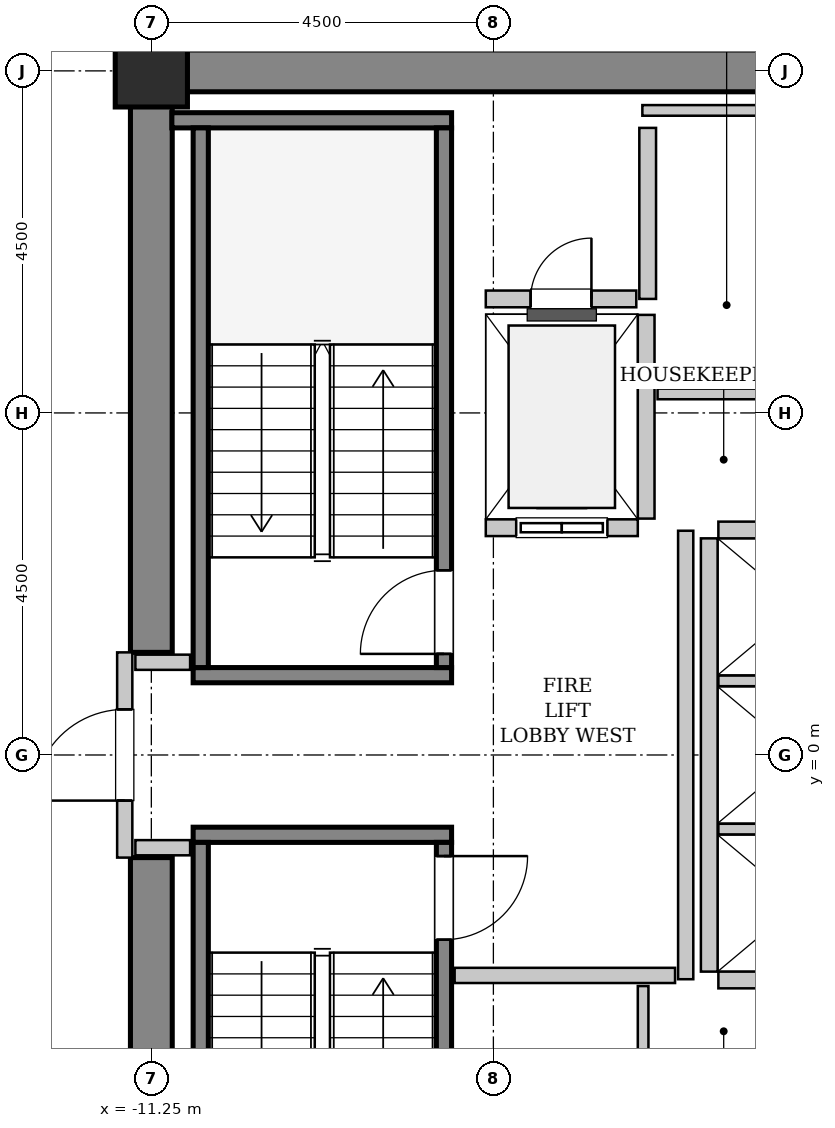
"""IFC4 building model, lengths in metres.
Left out: names, types, materials, properties, quantities, classifications, styles, units other than length and angle.
Written with IfcOpenShell. Run it as: python <this file> out.ifc"""

import sys

from ifc_helpers import new_model, si_unit, direction, frame, frame_2d, origin, origin_2d, place, context, subcontext, project, spatial, rectangle, hollow_rectangle, extrude, source, transform, mapped, element, fill, save


model = new_model("IFC4")
c1 = context("Model", 3, precision=1e-05, world=origin(), true_north=direction((0.0, 1.0)))
c2 = subcontext(c1, "Body", "Model", "MODEL_VIEW")
j1 = project(units=[si_unit("LENGTHUNIT", "METRE"), si_unit("PLANEANGLEUNIT", "RADIAN")], contexts=[c1])
p1 = place(None, origin())
s1 = spatial("IfcSite", under=j1, at=p1, CompositionType="ELEMENT")
p2 = place(p1, origin())
s2 = spatial("IfcBuilding", under=s1, at=p2, CompositionType="ELEMENT")
p3 = place(p2, frame((0.0, 0.0, 152.6)))
s3 = spatial("IfcBuildingStorey", under=s2, at=p3, CompositionType="ELEMENT", Elevation=152.6)
m1 = source(origin(), c2, "Body", "SweptSolid", [
    extrude(rectangle(XDim=9.975, YDim=0.55, at=frame_2d((4.987, 0.0))), origin(), (0.0, 0.0, 1.0), 3.8),
])
p4 = place(p3, frame((-11.525, 9.0, 0.0), z_axis=(0.0, 0.0, 1.0), x_axis=(1.0, 0.0, 0.0)))
e1 = element("IfcWall", 1, at=p4, inside=s3, PredefinedType="SHEAR", context=c2, shape_type="MappedRepresentation", body=[
    mapped(m1, transform((0.0, 0.0, 0.0), x_axis=(1.0, 0.0, 0.0), y_axis=(0.0, 1.0, 0.0), z_axis=(0.0, 0.0, 1.0), scale=1.0)),
])
m2 = source(origin(), c2, "Body", "SweptSolid", [
    extrude(rectangle(XDim=7.375, YDim=0.55, at=frame_2d((3.688, 0.0))), origin(), (0.0, 0.0, 1.0), 3.8),
])
for number, where, z_axis, x_axis in (
    (2, (-11.25, -8.725, 0.0), (0.0, 0.0, 1.0), (0.0, 1.0, 0.0)),
    (3, (-11.25, 1.35, 0.0), (0.0, 0.0, 1.0), (0.0, 1.0, 0.0)),
):
    element("IfcWall", number, at=place(p3, frame(where, z_axis=z_axis, x_axis=x_axis)), inside=s3, PredefinedType="SHEAR", context=c2, shape_type="MappedRepresentation", body=[
        mapped(m2, transform((0.0, 0.0, 0.0), x_axis=(1.0, 0.0, 0.0), y_axis=(0.0, 1.0, 0.0), z_axis=(0.0, 0.0, 1.0), scale=1.0)),
    ])
m3 = source(origin(), c2, "Body", "SweptSolid", [
    extrude(hollow_rectangle(XDim=0.95, YDim=0.95, WallThickness=0.045, InnerFilletRadius=0.045, OuterFilletRadius=0.09, at=origin_2d()), origin(), (0.0, 0.0, 1.0), 3.8),
])
p5 = place(p3, frame((-11.25, 9.0, 0.0), z_axis=(0.0, 0.0, 1.0), x_axis=(1.0, 0.0, 0.0)))
e4 = element("IfcColumn", 4, at=p5, inside=s3, PredefinedType="COLUMN", context=c2, shape_type="MappedRepresentation", body=[
    mapped(m3, transform((0.0, 0.0, 0.0), x_axis=(1.0, 0.0, 0.0), y_axis=(0.0, 1.0, 0.0), z_axis=(0.0, 0.0, 1.0), scale=1.0)),
])
m4 = source(origin(), c2, "Body", "SweptSolid", [
    extrude(rectangle(XDim=3.4, YDim=0.2, at=frame_2d((1.7, 0.0))), origin(), (0.0, 0.0, 1.0), 3.8),
])
p6 = place(p3, frame((-7.3, 1.05, 0.0), z_axis=(0.0, 0.0, 1.0), x_axis=(-1.0, 0.0, 0.0)))
e5 = element("IfcWall", 5, at=p6, inside=s3, PredefinedType="SOLIDWALL", context=c2, shape_type="MappedRepresentation", body=[
    mapped(m4, transform((0.0, 0.0, 0.0), x_axis=(1.0, 0.0, 0.0), y_axis=(0.0, 1.0, 0.0), z_axis=(0.0, 0.0, 1.0), scale=1.0)),
])
m5 = source(origin(), c2, "Body", "SweptSolid", [
    extrude(rectangle(XDim=3.68, YDim=0.2, at=frame_2d((1.84, 0.0))), origin(), (0.0, 0.0, 1.0), 3.8),
])
p7 = place(p3, frame((-7.3, 8.35, 0.0), z_axis=(0.0, 0.0, 1.0), x_axis=(-1.0, 0.0, 0.0)))
e6 = element("IfcWall", 6, at=p7, inside=s3, PredefinedType="SOLIDWALL", context=c2, shape_type="MappedRepresentation", body=[
    mapped(m5, transform((0.0, 0.0, 0.0), x_axis=(1.0, 0.0, 0.0), y_axis=(0.0, 1.0, 0.0), z_axis=(0.0, 0.0, 1.0), scale=1.0)),
])
m6 = source(origin(), c2, "Body", "SweptSolid", [
    extrude(rectangle(XDim=7.1, YDim=0.2, at=frame_2d((3.55, 0.0))), origin(), (0.0, 0.0, 1.0), 3.8),
])
p8 = place(p3, frame((-7.4, 1.15, 0.0), z_axis=(0.0, 0.0, 1.0), x_axis=(0.0, 1.0, 0.0)))
e7 = element("IfcWall", 7, at=p8, inside=s3, PredefinedType="SOLIDWALL", context=c2, shape_type="MappedRepresentation", body=[
    mapped(m6, transform((0.0, 0.0, 0.0), x_axis=(1.0, 0.0, 0.0), y_axis=(0.0, 1.0, 0.0), z_axis=(0.0, 0.0, 1.0), scale=1.0)),
])
p9 = place(p8, frame((0.18, 0.0, 0.0)))
e8 = element("IfcOpeningElement", 8, at=p9, cuts=e7, PredefinedType="OPENING", context=c2, shape_type="SweptSolid", body=[
    extrude(rectangle(XDim=1.1, YDim=2.15, at=frame_2d((0.55, 1.075))), frame((0.0, 0.11, 0.0), z_axis=(0.0, -1.0, 0.0), x_axis=(1.0, 0.0, 0.0)), (0.0, 0.0, 1.0), 0.22),
])
p10 = place(p3, frame((-10.6, 1.15, 0.0), z_axis=(0.0, 0.0, 1.0), x_axis=(0.0, 1.0, 0.0)))
e9 = element("IfcWall", 9, at=p10, inside=s3, PredefinedType="SOLIDWALL", context=c2, shape_type="MappedRepresentation", body=[
    mapped(m6, transform((0.0, 0.0, 0.0), x_axis=(1.0, 0.0, 0.0), y_axis=(0.0, 1.0, 0.0), z_axis=(0.0, 0.0, 1.0), scale=1.0)),
])
p11 = place(p3, frame((-10.7, -1.05, 0.0), z_axis=(0.0, 0.0, 1.0), x_axis=(1.0, 0.0, 0.0)))
e10 = element("IfcWall", 10, at=p11, inside=s3, PredefinedType="SOLIDWALL", context=c2, shape_type="MappedRepresentation", body=[
    mapped(m4, transform((0.0, 0.0, 0.0), x_axis=(1.0, 0.0, 0.0), y_axis=(0.0, 1.0, 0.0), z_axis=(0.0, 0.0, 1.0), scale=1.0)),
])
p12 = place(p3, frame((-10.6, -1.15, 0.0), z_axis=(0.0, 0.0, 1.0), x_axis=(0.0, -1.0, 0.0)))
e11 = element("IfcWall", 11, at=p12, inside=s3, PredefinedType="SOLIDWALL", context=c2, shape_type="MappedRepresentation", body=[
    mapped(m6, transform((0.0, 0.0, 0.0), x_axis=(1.0, 0.0, 0.0), y_axis=(0.0, 1.0, 0.0), z_axis=(0.0, 0.0, 1.0), scale=1.0)),
])
p13 = place(p3, frame((-7.4, -1.15, 0.0), z_axis=(0.0, 0.0, 1.0), x_axis=(0.0, -1.0, 0.0)))
e12 = element("IfcWall", 12, at=p13, inside=s3, PredefinedType="SOLIDWALL", context=c2, shape_type="MappedRepresentation", body=[
    mapped(m6, transform((0.0, 0.0, 0.0), x_axis=(1.0, 0.0, 0.0), y_axis=(0.0, 1.0, 0.0), z_axis=(0.0, 0.0, 1.0), scale=1.0)),
])
p14 = place(p13, frame((0.18, 0.0, 0.0)))
e13 = element("IfcOpeningElement", 13, at=p14, cuts=e12, PredefinedType="OPENING", context=c2, shape_type="SweptSolid", body=[
    extrude(rectangle(XDim=1.1, YDim=2.15, at=frame_2d((0.55, 1.075))), frame((0.0, 0.11, 0.0), z_axis=(0.0, -1.0, 0.0), x_axis=(1.0, 0.0, 0.0)), (0.0, 0.0, 1.0), 0.22),
])
m7 = source(origin(), c2, "Body", "SweptSolid", [
    extrude(rectangle(XDim=2.0, YDim=0.22, at=frame_2d((1.0, 0.0))), origin(), (0.0, 0.0, 1.0), 3.535),
])
p15 = place(p3, frame((-6.85, 2.99, 0.0), z_axis=(0.0, 0.0, 1.0), x_axis=(1.0, 0.0, 0.0)))
e14 = element("IfcWall", 14, at=p15, inside=s3, PredefinedType="SOLIDWALL", context=c2, shape_type="MappedRepresentation", body=[
    mapped(m7, transform((0.0, 0.0, 0.0), x_axis=(1.0, 0.0, 0.0), y_axis=(0.0, 1.0, 0.0), z_axis=(0.0, 0.0, 1.0), scale=1.0)),
])
p16 = place(p15, frame((0.4, 0.0, 0.0)))
e15 = element("IfcOpeningElement", 15, at=p16, cuts=e14, PredefinedType="OPENING", context=c2, shape_type="SweptSolid", body=[
    extrude(rectangle(XDim=1.2, YDim=2.2, at=frame_2d((0.6, 1.1))), frame((0.0, 0.12, 0.0), z_axis=(0.0, -1.0, 0.0), x_axis=(1.0, 0.0, 0.0)), (0.0, 0.0, 1.0), 0.24),
])
m8 = source(origin(), c2, "Body", "SweptSolid", [
    extrude(rectangle(XDim=2.68, YDim=0.22, at=frame_2d((1.34, 0.0))), origin(), (0.0, 0.0, 1.0), 3.535),
])
p17 = place(p3, frame((-4.74, 3.11, 0.0), z_axis=(0.0, 0.0, 1.0), x_axis=(0.0, 1.0, 0.0)))
e16 = element("IfcWall", 16, at=p17, inside=s3, PredefinedType="SOLIDWALL", context=c2, shape_type="MappedRepresentation", body=[
    mapped(m8, transform((0.0, 0.0, 0.0), x_axis=(1.0, 0.0, 0.0), y_axis=(0.0, 1.0, 0.0), z_axis=(0.0, 0.0, 1.0), scale=1.0)),
])
m9 = source(origin(), c2, "Body", "SweptSolid", [
    extrude(rectangle(XDim=5.7, YDim=0.22, at=frame_2d((2.85, 0.0))), origin(), (0.0, 0.0, 1.0), 3.535),
])
p18 = place(p3, frame((-3.91, 2.85, 0.0), z_axis=(0.0, 0.0, 1.0), x_axis=(0.0, -1.0, 0.0)))
e17 = element("IfcWall", 17, at=p18, inside=s3, PredefinedType="SOLIDWALL", context=c2, shape_type="MappedRepresentation", body=[
    mapped(m9, transform((0.0, 0.0, 0.0), x_axis=(1.0, 0.0, 0.0), y_axis=(0.0, 1.0, 0.0), z_axis=(0.0, 0.0, 1.0), scale=1.0)),
])
m10 = source(origin(), c2, "Body", "SweptSolid", [
    extrude(rectangle(XDim=2.13, YDim=0.22, at=frame_2d((1.065, 0.0))), origin(), (0.0, 0.0, 1.0), 3.535),
])
p19 = place(p3, frame((-3.79, -2.96, 0.0), z_axis=(0.0, 0.0, 1.0), x_axis=(1.0, 0.0, 0.0)))
e18 = element("IfcWall", 18, at=p19, inside=s3, PredefinedType="SOLIDWALL", context=c2, shape_type="MappedRepresentation", body=[
    mapped(m10, transform((0.0, 0.0, 0.0), x_axis=(1.0, 0.0, 0.0), y_axis=(0.0, 1.0, 0.0), z_axis=(0.0, 0.0, 1.0), scale=1.0)),
])
m11 = source(origin(), c2, "Body", "SweptSolid", [
    extrude(rectangle(XDim=2.13, YDim=0.14, at=frame_2d((1.065, 0.0))), origin(), (0.0, 0.0, 1.0), 3.535),
])
for number, where, z_axis, x_axis in (
    (19, (-3.79, -0.975, 0.0), (0.0, 0.0, 1.0), (1.0, 0.0, 0.0)),
    (20, (-3.79, 0.975, 0.0), (0.0, 0.0, 1.0), (1.0, 0.0, 0.0)),
):
    element("IfcWall", number, at=place(p3, frame(where, z_axis=z_axis, x_axis=x_axis)), inside=s3, PredefinedType="PARTITIONING", context=c2, shape_type="MappedRepresentation", body=[
        mapped(m11, transform((0.0, 0.0, 0.0), x_axis=(1.0, 0.0, 0.0), y_axis=(0.0, 1.0, 0.0), z_axis=(0.0, 0.0, 1.0), scale=1.0)),
    ])
p20 = place(p3, frame((-1.66, 2.96, 0.0), z_axis=(0.0, 0.0, 1.0), x_axis=(-1.0, 0.0, 0.0)))
e21 = element("IfcWall", 21, at=p20, inside=s3, PredefinedType="SOLIDWALL", context=c2, shape_type="MappedRepresentation", body=[
    mapped(m10, transform((0.0, 0.0, 0.0), x_axis=(1.0, 0.0, 0.0), y_axis=(0.0, 1.0, 0.0), z_axis=(0.0, 0.0, 1.0), scale=1.0)),
])
m12 = source(origin(), c2, "Body", "SweptSolid", [
    extrude(rectangle(XDim=2.25, YDim=0.22, at=frame_2d((1.125, 0.0))), origin(), (0.0, 0.0, 1.0), 3.535),
])
p21 = place(p3, frame((-4.72, 6.0, 0.0), z_axis=(0.0, 0.0, 1.0), x_axis=(0.0, 1.0, 0.0)))
e22 = element("IfcWall", 22, at=p21, inside=s3, PredefinedType="SOLIDWALL", context=c2, shape_type="MappedRepresentation", body=[
    mapped(m12, transform((0.0, 0.0, 0.0), x_axis=(1.0, 0.0, 0.0), y_axis=(0.0, 1.0, 0.0), z_axis=(0.0, 0.0, 1.0), scale=1.0)),
])
m13 = source(origin(), c2, "Body", "SweptSolid", [
    extrude(rectangle(XDim=1.98, YDim=0.22, at=frame_2d((0.99, 0.0))), origin(), (0.0, 0.0, 1.0), 3.535),
])
p22 = place(p3, frame((-6.85, 6.0, 0.0), z_axis=(0.0, 0.0, 1.0), x_axis=(1.0, 0.0, 0.0)))
e23 = element("IfcWall", 23, at=p22, inside=s3, PredefinedType="SOLIDWALL", context=c2, shape_type="MappedRepresentation", body=[
    mapped(m13, transform((0.0, 0.0, 0.0), x_axis=(1.0, 0.0, 0.0), y_axis=(0.0, 1.0, 0.0), z_axis=(0.0, 0.0, 1.0), scale=1.0)),
])
p23 = place(p22, frame((0.59, 0.0, 0.0)))
e24 = element("IfcOpeningElement", 24, at=p23, cuts=e23, PredefinedType="OPENING", context=c2, shape_type="SweptSolid", body=[
    extrude(rectangle(XDim=0.8, YDim=2.0, at=frame_2d((0.4, 1.0))), frame((0.0, 0.12, 0.0), z_axis=(0.0, -1.0, 0.0), x_axis=(1.0, 0.0, 0.0)), (0.0, 0.0, 1.0), 0.24),
])
m14 = source(origin(), c2, "Body", "SweptSolid", [
    extrude(rectangle(XDim=2.7, YDim=0.2, at=frame_2d((1.35, 0.0))), origin(), (0.0, 0.0, 1.0), 2.425),
])
p24 = place(p3, frame((-11.6, -1.35, 0.0), z_axis=(0.0, 0.0, 1.0), x_axis=(0.0, 1.0, 0.0)))
e25 = element("IfcWall", 25, at=p24, inside=s3, PredefinedType="PARTITIONING", context=c2, shape_type="MappedRepresentation", body=[
    mapped(m14, transform((0.0, 0.0, 0.0), x_axis=(1.0, 0.0, 0.0), y_axis=(0.0, 1.0, 0.0), z_axis=(0.0, 0.0, 1.0), scale=1.0)),
])
p25 = place(p24, frame((0.75, 0.0, 0.0)))
e26 = element("IfcOpeningElement", 26, at=p25, cuts=e25, PredefinedType="OPENING", context=c2, shape_type="SweptSolid", body=[
    extrude(rectangle(XDim=1.2, YDim=2.15, at=frame_2d((0.6, 1.075))), frame((0.0, 0.11, 0.0), z_axis=(0.0, -1.0, 0.0), x_axis=(1.0, 0.0, 0.0)), (0.0, 0.0, 1.0), 0.22),
])
m15 = source(origin(), c2, "Body", "SweptSolid", [
    extrude(rectangle(XDim=5.9, YDim=0.2, at=frame_2d((2.95, 0.0))), origin(), (0.0, 0.0, 1.0), 3.535),
])
p26 = place(p3, frame((-4.22, -2.95, 0.0), z_axis=(0.0, 0.0, 1.0), x_axis=(0.0, 1.0, 0.0)))
e27 = element("IfcWall", 27, at=p26, inside=s3, PredefinedType="PARTITIONING", context=c2, shape_type="MappedRepresentation", body=[
    mapped(m15, transform((0.0, 0.0, 0.0), x_axis=(1.0, 0.0, 0.0), y_axis=(0.0, 1.0, 0.0), z_axis=(0.0, 0.0, 1.0), scale=1.0)),
])
m16 = source(origin(), c2, "Body", "SweptSolid", [
    extrude(rectangle(XDim=2.9, YDim=0.2, at=frame_2d((1.45, 0.0))), origin(), (0.0, 0.0, 1.0), 3.535),
])
p27 = place(p3, frame((-7.26, -2.9, 0.0), z_axis=(0.0, 0.0, 1.0), x_axis=(1.0, 0.0, 0.0)))
e28 = element("IfcWall", 28, at=p27, inside=s3, PredefinedType="PARTITIONING", context=c2, shape_type="MappedRepresentation", body=[
    mapped(m16, transform((0.0, 0.0, 0.0), x_axis=(1.0, 0.0, 0.0), y_axis=(0.0, 1.0, 0.0), z_axis=(0.0, 0.0, 1.0), scale=1.0)),
])
m17 = source(origin(), c2, "Body", "SweptSolid", [
    extrude(rectangle(XDim=0.72, YDim=0.2, at=frame_2d((0.36, 0.0))), origin(), (0.0, 0.0, 1.0), 3.535),
])
for number, where, z_axis, x_axis in (
    (29, (-11.46, 1.22, 0.0), (0.0, 0.0, 1.0), (1.0, 0.0, 0.0)),
    (30, (-11.46, -1.22, 0.0), (0.0, 0.0, 1.0), (1.0, 0.0, 0.0)),
):
    element("IfcWall", number, at=place(p3, frame(where, z_axis=z_axis, x_axis=x_axis)), inside=s3, PredefinedType="PARTITIONING", context=c2, shape_type="MappedRepresentation", body=[
        mapped(m17, transform((0.0, 0.0, 0.0), x_axis=(1.0, 0.0, 0.0), y_axis=(0.0, 1.0, 0.0), z_axis=(0.0, 0.0, 1.0), scale=1.0)),
    ])
m18 = source(origin(), c2, "Body", "SweptSolid", [
    extrude(rectangle(XDim=2.95, YDim=0.14, at=frame_2d((1.475, 0.0))), origin(), (0.0, 0.0, 1.0), 3.535),
])
p28 = place(p3, frame((-4.59, 4.75, 0.0), z_axis=(0.0, 0.0, 1.0), x_axis=(1.0, 0.0, 0.0)))
e31 = element("IfcWall", 31, at=p28, inside=s3, PredefinedType="PARTITIONING", context=c2, shape_type="MappedRepresentation", body=[
    mapped(m18, transform((0.0, 0.0, 0.0), x_axis=(1.0, 0.0, 0.0), y_axis=(0.0, 1.0, 0.0), z_axis=(0.0, 0.0, 1.0), scale=1.0)),
])
m19 = source(origin(), c2, "Body", "SweptSolid", [
    extrude(rectangle(XDim=3.15, YDim=0.14, at=frame_2d((1.575, 0.0))), origin(), (0.0, 0.0, 1.0), 3.535),
])
p29 = place(p3, frame((-4.79, 8.48, 0.0), z_axis=(0.0, 0.0, 1.0), x_axis=(1.0, 0.0, 0.0)))
e32 = element("IfcWall", 32, at=p29, inside=s3, PredefinedType="PARTITIONING", context=c2, shape_type="MappedRepresentation", body=[
    mapped(m19, transform((0.0, 0.0, 0.0), x_axis=(1.0, 0.0, 0.0), y_axis=(0.0, 1.0, 0.0), z_axis=(0.0, 0.0, 1.0), scale=1.0)),
])
m20 = source(origin(), c2, "Body", "SweptSolid", [
    extrude(rectangle(XDim=1.1, YDim=0.14, at=frame_2d((0.55, 0.0))), origin(), (0.0, 0.0, 1.0), 3.535),
])
p30 = place(p3, frame((-4.78, -4.14, 0.0), z_axis=(0.0, 0.0, 1.0), x_axis=(0.0, 1.0, 0.0)))
e33 = element("IfcWall", 33, at=p30, inside=s3, PredefinedType="PARTITIONING", context=c2, shape_type="MappedRepresentation", body=[
    mapped(m20, transform((0.0, 0.0, 0.0), x_axis=(1.0, 0.0, 0.0), y_axis=(0.0, 1.0, 0.0), z_axis=(0.0, 0.0, 1.0), scale=1.0)),
])
m21 = source(origin(), c2, "Body", "SweptSolid", [
    extrude(rectangle(XDim=1.1, YDim=2.15, at=frame_2d((0.55, 1.075))), frame((0.0, 0.025, 0.0), z_axis=(0.0, -1.0, 0.0), x_axis=(1.0, 0.0, 0.0)), (0.0, 0.0, 1.0), 0.05),
])
p31 = place(p9, origin())
e34 = element("IfcDoor", 34, at=p31, inside=s3, OperationType="SINGLE_SWING_LEFT", PredefinedType="DOOR", context=c2, shape_type="MappedRepresentation", body=[
    mapped(m21, transform((0.0, 0.0, 0.0), x_axis=(1.0, 0.0, 0.0), y_axis=(0.0, 1.0, 0.0), z_axis=(0.0, 0.0, 1.0), scale=1.0)),
])
fill(e8, e34)
p32 = place(p14, origin())
e35 = element("IfcDoor", 35, at=p32, inside=s3, OperationType="SINGLE_SWING_LEFT", PredefinedType="DOOR", context=c2, shape_type="MappedRepresentation", body=[
    mapped(m21, transform((0.0, 0.0, 0.0), x_axis=(1.0, 0.0, 0.0), y_axis=(0.0, 1.0, 0.0), z_axis=(0.0, 0.0, 1.0), scale=1.0)),
])
fill(e13, e35)
m22 = source(origin(), c2, "Body", "SweptSolid", [
    extrude(rectangle(XDim=1.2, YDim=2.2, at=frame_2d((0.6, 1.1))), frame((0.0, 0.025, 0.0), z_axis=(0.0, -1.0, 0.0), x_axis=(1.0, 0.0, 0.0)), (0.0, 0.0, 1.0), 0.05),
])
p33 = place(p16, origin())
e36 = element("IfcDoor", 36, at=p33, inside=s3, OperationType="SLIDING_TO_LEFT", PredefinedType="DOOR", context=c2, shape_type="MappedRepresentation", body=[
    mapped(m22, transform((0.0, 0.0, 0.0), x_axis=(1.0, 0.0, 0.0), y_axis=(0.0, 1.0, 0.0), z_axis=(0.0, 0.0, 1.0), scale=1.0)),
])
fill(e15, e36)
m23 = source(origin(), c2, "Body", "SweptSolid", [
    extrude(rectangle(XDim=0.8, YDim=2.0, at=frame_2d((0.4, 1.0))), frame((0.0, 0.025, 0.0), z_axis=(0.0, -1.0, 0.0), x_axis=(1.0, 0.0, 0.0)), (0.0, 0.0, 1.0), 0.05),
])
p34 = place(p23, origin())
e37 = element("IfcDoor", 37, at=p34, inside=s3, OperationType="SINGLE_SWING_RIGHT", PredefinedType="TRAPDOOR", context=c2, shape_type="MappedRepresentation", body=[
    mapped(m23, transform((0.0, 0.0, 0.0), x_axis=(1.0, 0.0, 0.0), y_axis=(0.0, 1.0, 0.0), z_axis=(0.0, 0.0, 1.0), scale=1.0)),
])
fill(e24, e37)
m24 = source(origin(), c2, "Body", "SweptSolid", [
    extrude(rectangle(XDim=1.2, YDim=2.15, at=frame_2d((0.6, 1.075))), frame((0.0, 0.025, 0.0), z_axis=(0.0, -1.0, 0.0), x_axis=(1.0, 0.0, 0.0)), (0.0, 0.0, 1.0), 0.05),
])
p35 = place(p25, origin())
e38 = element("IfcDoor", 38, at=p35, inside=s3, OperationType="SINGLE_SWING_LEFT", PredefinedType="DOOR", context=c2, shape_type="MappedRepresentation", body=[
    mapped(m24, transform((0.0, 0.0, 0.0), x_axis=(1.0, 0.0, 0.0), y_axis=(0.0, 1.0, 0.0), z_axis=(0.0, 0.0, 1.0), scale=1.0)),
])
fill(e26, e38)
save(model, sys.argv[1])
